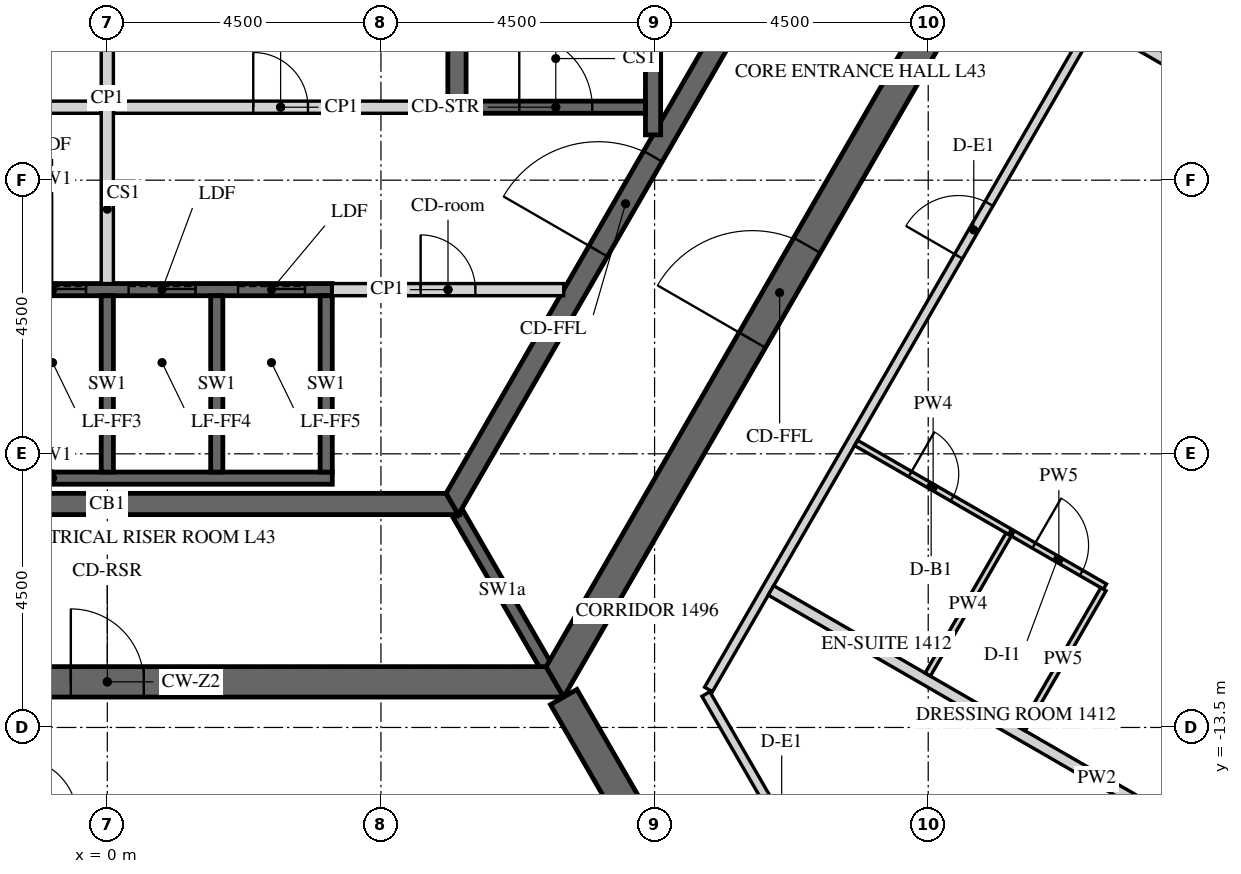
"""IFC4 building model, lengths in metres.
Left out: names, types, materials, properties, quantities, classifications, styles, units other than length and angle.
Written with IfcOpenShell. Run it as: python <this file> out.ifc"""

import sys

from ifc_helpers import new_model, si_unit, direction, frame, frame_2d, origin, place, context, subcontext, project, spatial, polyline, rectangle, outline, extrude, element, fill, save


model = new_model("IFC4")
c1 = context("Model", 3, precision=1e-05, world=origin(), true_north=direction((0.0, 1.0)))
c2 = subcontext(c1, "Body", "Model", "MODEL_VIEW")
j1 = project(units=[si_unit("LENGTHUNIT", "METRE"), si_unit("PLANEANGLEUNIT", "RADIAN")], contexts=[c1])
p1 = place(None, origin())
s1 = spatial("IfcSite", under=j1, at=p1, CompositionType="ELEMENT")
p2 = place(p1, origin())
s2 = spatial("IfcBuilding", under=s1, at=p2, CompositionType="ELEMENT")
p3 = place(p2, frame((0.0, 0.0, 183.9)))
s3 = spatial("IfcBuildingStorey", under=s2, at=p3, CompositionType="ELEMENT", Elevation=183.9)
p4 = place(p3, frame((-7.361, -12.75, -0.15), z_axis=(0.0, 0.0, 1.0), x_axis=(1.0, 0.0, 0.0)))
e1 = element("IfcWall", 1, at=p4, inside=s3, PredefinedType="SHEAR", context=c2, shape_type="SweptSolid", body=[
    extrude(outline(polyline([(-0.144, -0.25), (14.866, -0.25), (14.578, 0.25), (0.144, 0.25), (-0.144, -0.25)])), origin(), (0.0, 0.0, 1.0), 3.9),
])
p5 = place(p4, frame((6.761, 0.0, 0.15)))
e2 = element("IfcOpeningElement", 2, at=p5, cuts=e1, PredefinedType="OPENING", context=c2, shape_type="SweptSolid", body=[
    extrude(rectangle(XDim=1.2, YDim=2.4, at=frame_2d((0.6, 1.2))), frame((0.0, 0.26, 0.0), z_axis=(0.0, -1.0, 0.0), x_axis=(1.0, 0.0, 0.0)), (0.0, 0.0, 1.0), 0.52),
])
p6 = place(p3, frame((7.361, -12.75, -0.15), z_axis=(0.0, 0.0, 1.0), x_axis=(0.50000571537, 0.866022103989, 0.0)))
e3 = element("IfcWall", 3, at=p6, inside=s3, PredefinedType="SHEAR", context=c2, shape_type="SweptSolid", body=[
    extrude(outline(polyline([(-0.144, -0.25), (14.867, -0.25), (14.578, 0.25), (0.144, 0.25), (-0.144, -0.25)])), origin(), (0.0, 0.0, 1.0), 3.9),
])
p7 = place(p6, frame((6.49, 0.0, 0.15)))
e4 = element("IfcOpeningElement", 4, at=p7, cuts=e3, PredefinedType="OPENING", context=c2, shape_type="SweptSolid", body=[
    extrude(rectangle(XDim=1.8, YDim=2.4, at=frame_2d((0.9, 1.2))), frame((0.0, 0.26, 0.0), z_axis=(0.0, -1.0, 0.0), x_axis=(1.0, 0.0, 0.0)), (0.0, 0.0, 1.0), 0.52),
])
p8 = place(p3, frame((7.506, -13.0, -0.15), z_axis=(0.0, 0.0, 1.0), x_axis=(0.499988271576, -0.866032175087, 0.0)))
e5 = element("IfcWall", 5, at=p8, inside=s3, PredefinedType="SHEAR", context=c2, shape_type="SweptSolid", body=[
    extrude(rectangle(XDim=15.424, YDim=0.5, at=frame_2d((7.712, 0.0))), origin(), (0.0, 0.0, 1.0), 3.9),
])
p9 = place(p8, frame((6.812, 0.0, 0.15)))
e6 = element("IfcOpeningElement", 6, at=p9, cuts=e5, PredefinedType="OPENING", context=c2, shape_type="SweptSolid", body=[
    extrude(rectangle(XDim=1.8, YDim=2.4, at=frame_2d((0.9, 1.2))), frame((0.0, 0.26, 0.0), z_axis=(0.0, -1.0, 0.0), x_axis=(1.0, 0.0, 0.0)), (0.0, 0.0, 1.0), 0.52),
])
p10 = place(p3, frame((-5.673, -9.825, -0.15), z_axis=(0.0, 0.0, 1.0), x_axis=(1.0, 0.0, 0.0)))
e7 = element("IfcWall", 7, at=p10, inside=s3, PredefinedType="SHEAR", context=c2, shape_type="SweptSolid", body=[
    extrude(outline(polyline([(-0.101, -0.175), (11.446, -0.175), (11.244, 0.175), (0.101, 0.175), (-0.101, -0.175)])), origin(), (0.0, 0.0, 1.0), 3.9),
])
p11 = place(p3, frame((5.673, -9.825, -0.15), z_axis=(0.0, 0.0, 1.0), x_axis=(0.499995046907, 0.866028263435, 0.0)))
e8 = element("IfcWall", 8, at=p11, inside=s3, PredefinedType="SHEAR", context=c2, shape_type="SweptSolid", body=[
    extrude(outline(polyline([(-0.101, -0.175), (11.446, -0.175), (11.244, 0.175), (0.101, 0.175), (-0.101, -0.175)])), origin(), (0.0, 0.0, 1.0), 3.9),
])
p12 = place(p11, frame((4.801, 0.0, 0.15)))
e9 = element("IfcOpeningElement", 9, at=p12, cuts=e8, PredefinedType="OPENING", context=c2, shape_type="SweptSolid", body=[
    extrude(rectangle(XDim=1.8, YDim=2.4, at=frame_2d((0.9, 1.2))), frame((0.0, 0.185, 0.0), z_axis=(0.0, -1.0, 0.0), x_axis=(1.0, 0.0, 0.0)), (0.0, 0.0, 1.0), 0.37),
])
p13 = place(p3, frame((-5.5, -6.3, -0.25), z_axis=(0.0, 0.0, 1.0), x_axis=(1.0, 0.0, 0.0)))
e10 = element("IfcWall", 10, at=p13, inside=s3, PredefinedType="SHEAR", context=c2, shape_type="SweptSolid", body=[
    extrude(rectangle(XDim=9.2, YDim=0.2, at=frame_2d((4.6, 0.0))), origin(), (0.0, 0.0, 1.0), 3.9),
])
p14 = place(p13, frame((0.45, 0.0, 0.25)))
e11 = element("IfcOpeningElement", 11, at=p14, cuts=e10, PredefinedType="OPENING", context=c2, shape_type="SweptSolid", body=[
    extrude(rectangle(XDim=1.1, YDim=2.1, at=frame_2d((0.55, 1.05))), frame((0.0, 0.11, 0.0), z_axis=(0.0, -1.0, 0.0), x_axis=(1.0, 0.0, 0.0)), (0.0, 0.0, 1.0), 0.22),
])
p15 = place(p13, frame((2.25, 0.0, 0.25)))
e12 = element("IfcOpeningElement", 12, at=p15, cuts=e10, PredefinedType="OPENING", context=c2, shape_type="SweptSolid", body=[
    extrude(rectangle(XDim=1.1, YDim=2.1, at=frame_2d((0.55, 1.05))), frame((0.0, 0.11, 0.0), z_axis=(0.0, -1.0, 0.0), x_axis=(1.0, 0.0, 0.0)), (0.0, 0.0, 1.0), 0.22),
])
p16 = place(p13, frame((4.05, 0.0, 0.25)))
e13 = element("IfcOpeningElement", 13, at=p16, cuts=e10, PredefinedType="OPENING", context=c2, shape_type="SweptSolid", body=[
    extrude(rectangle(XDim=1.1, YDim=2.1, at=frame_2d((0.55, 1.05))), frame((0.0, 0.11, 0.0), z_axis=(0.0, -1.0, 0.0), x_axis=(1.0, 0.0, 0.0)), (0.0, 0.0, 1.0), 0.22),
])
p17 = place(p13, frame((5.85, 0.0, 0.25)))
e14 = element("IfcOpeningElement", 14, at=p17, cuts=e10, PredefinedType="OPENING", context=c2, shape_type="SweptSolid", body=[
    extrude(rectangle(XDim=1.1, YDim=2.1, at=frame_2d((0.55, 1.05))), frame((0.0, 0.11, 0.0), z_axis=(0.0, -1.0, 0.0), x_axis=(1.0, 0.0, 0.0)), (0.0, 0.0, 1.0), 0.22),
])
p18 = place(p13, frame((7.65, 0.0, 0.25)))
e15 = element("IfcOpeningElement", 15, at=p18, cuts=e10, PredefinedType="OPENING", context=c2, shape_type="SweptSolid", body=[
    extrude(rectangle(XDim=1.1, YDim=2.1, at=frame_2d((0.55, 1.05))), frame((0.0, 0.11, 0.0), z_axis=(0.0, -1.0, 0.0), x_axis=(1.0, 0.0, 0.0)), (0.0, 0.0, 1.0), 0.22),
])
p19 = place(p3, frame((-5.5, -9.4, -0.25), z_axis=(0.0, 0.0, 1.0), x_axis=(1.0, 0.0, 0.0)))
e16 = element("IfcWall", 16, at=p19, inside=s3, PredefinedType="SHEAR", context=c2, shape_type="SweptSolid", body=[
    extrude(rectangle(XDim=9.2, YDim=0.2, at=frame_2d((4.6, 0.0))), origin(), (0.0, 0.0, 1.0), 3.9),
])
for number, where, z_axis, x_axis in (
    (17, (0.0, -9.3, -0.25), (0.0, 0.0, 1.0), (0.0, 1.0, 0.0)),
    (18, (1.8, -9.3, -0.25), (0.0, 0.0, 1.0), (0.0, 1.0, 0.0)),
    (19, (3.6, -9.3, -0.25), (0.0, 0.0, 1.0), (0.0, 1.0, 0.0)),
):
    element("IfcWall", number, at=place(p3, frame(where, z_axis=z_axis, x_axis=x_axis)), inside=s3, PredefinedType="SHEAR", context=c2, shape_type="SweptSolid", body=[
        extrude(rectangle(XDim=2.9, YDim=0.2, at=frame_2d((1.45, 0.0))), origin(), (0.0, 0.0, 1.0), 3.9),
    ])
p20 = place(p3, frame((-5.6, -3.3, 0.0), z_axis=(0.0, 0.0, 1.0), x_axis=(1.0, 0.0, 0.0)))
e20 = element("IfcWall", 20, at=p20, inside=s3, PredefinedType="PARTITIONING", context=c2, shape_type="SweptSolid", body=[
    extrude(rectangle(XDim=5.5, YDim=0.2, at=frame_2d((2.75, 0.0))), origin(), (0.0, 0.0, 1.0), 3.65),
])
p21 = place(p20, frame((2.3, 0.0, 0.0)))
e21 = element("IfcOpeningElement", 21, at=p21, cuts=e20, PredefinedType="OPENING", context=c2, shape_type="SweptSolid", body=[
    extrude(rectangle(XDim=0.9, YDim=2.1, at=frame_2d((0.45, 1.05))), frame((0.0, 0.11, 0.0), z_axis=(0.0, -1.0, 0.0), x_axis=(1.0, 0.0, 0.0)), (0.0, 0.0, 1.0), 0.22),
])
p22 = place(p3, frame((0.1, -3.3, 0.0), z_axis=(0.0, 0.0, 1.0), x_axis=(1.0, 0.0, 0.0)))
e22 = element("IfcWall", 22, at=p22, inside=s3, PredefinedType="PARTITIONING", context=c2, shape_type="SweptSolid", body=[
    extrude(rectangle(XDim=5.5, YDim=0.2, at=frame_2d((2.75, 0.0))), origin(), (0.0, 0.0, 1.0), 3.65),
])
p23 = place(p22, frame((2.3, 0.0, 0.0)))
e23 = element("IfcOpeningElement", 23, at=p23, cuts=e22, PredefinedType="OPENING", context=c2, shape_type="SweptSolid", body=[
    extrude(rectangle(XDim=0.9, YDim=2.1, at=frame_2d((0.45, 1.05))), frame((0.0, 0.11, 0.0), z_axis=(0.0, -1.0, 0.0), x_axis=(1.0, 0.0, 0.0)), (0.0, 0.0, 1.0), 0.22),
])
p24 = place(p3, frame((0.0, -6.2, 0.0), z_axis=(0.0, 0.0, 1.0), x_axis=(0.0, 1.0, 0.0)))
e24 = element("IfcWall", 24, at=p24, inside=s3, PredefinedType="PARTITIONING", context=c2, shape_type="SweptSolid", body=[
    extrude(rectangle(XDim=6.1, YDim=0.2, at=frame_2d((3.05, 0.0))), origin(), (0.0, 0.0, 1.0), 3.65),
])
p25 = place(p3, frame((3.7, -6.3, 0.0), z_axis=(0.0, 0.0, 1.0), x_axis=(1.0, 0.0, 0.0)))
e25 = element("IfcWall", 25, at=p25, inside=s3, PredefinedType="PARTITIONING", context=c2, shape_type="SweptSolid", body=[
    extrude(rectangle(XDim=3.806, YDim=0.2, at=frame_2d((1.903, 0.0))), origin(), (0.0, 0.0, 1.0), 3.65),
])
p26 = place(p25, frame((1.453, 0.0, 0.0)))
e26 = element("IfcOpeningElement", 26, at=p26, cuts=e25, PredefinedType="OPENING", context=c2, shape_type="SweptSolid", body=[
    extrude(rectangle(XDim=0.9, YDim=2.1, at=frame_2d((0.45, 1.05))), frame((0.0, 0.11, 0.0), z_axis=(0.0, -1.0, 0.0), x_axis=(1.0, 0.0, 0.0)), (0.0, 0.0, 1.0), 0.22),
])
p27 = place(p3, frame((5.773, -10.0, -0.15), z_axis=(0.0, 0.0, 1.0), x_axis=(0.499995765644, -0.866027848477, 0.0)))
e27 = element("IfcWall", 27, at=p27, inside=s3, PredefinedType="SHEAR", context=c2, shape_type="SweptSolid", body=[
    extrude(rectangle(XDim=2.887, YDim=0.2, at=frame_2d((1.443, 0.0))), origin(), (0.0, 0.0, 1.0), 3.9),
])
p28 = place(p3, frame((5.75, -3.4, -0.25), z_axis=(0.0, 0.0, 1.0), x_axis=(0.0, 1.0, 0.0)))
e28 = element("IfcWall", 28, at=p28, inside=s3, PredefinedType="SHEAR", context=c2, shape_type="SweptSolid", body=[
    extrude(rectangle(XDim=6.8, YDim=0.3, at=frame_2d((3.4, 0.0))), origin(), (0.0, 0.0, 1.0), 3.9),
])
p29 = place(p3, frame((8.975, -3.755, -0.25), z_axis=(0.0, 0.0, 1.0), x_axis=(0.0, 1.0, 0.0)))
e29 = element("IfcWall", 29, at=p29, inside=s3, PredefinedType="SHEAR", context=c2, shape_type="SweptSolid", body=[
    extrude(rectangle(XDim=7.51, YDim=0.25, at=frame_2d((3.755, 0.0))), origin(), (0.0, 0.0, 1.0), 3.9),
])
p30 = place(p3, frame((5.9, -3.3, -0.25), z_axis=(0.0, 0.0, 1.0), x_axis=(1.0, 0.0, 0.0)))
e30 = element("IfcWall", 30, at=p30, inside=s3, PredefinedType="SHEAR", context=c2, shape_type="SweptSolid", body=[
    extrude(rectangle(XDim=2.95, YDim=0.2, at=frame_2d((1.475, 0.0))), origin(), (0.0, 0.0, 1.0), 3.9),
])
p31 = place(p30, frame((0.875, 0.0, 0.25)))
e31 = element("IfcOpeningElement", 31, at=p31, cuts=e30, PredefinedType="OPENING", context=c2, shape_type="SweptSolid", body=[
    extrude(rectangle(XDim=1.2, YDim=2.4, at=frame_2d((0.6, 1.2))), frame((0.0, 0.11, 0.0), z_axis=(0.0, -1.0, 0.0), x_axis=(1.0, 0.0, 0.0)), (0.0, 0.0, 1.0), 0.22),
])
p32 = place(p3, frame((13.699, -19.628, 0.0), z_axis=(0.0, 0.0, 1.0), x_axis=(-0.499993780622, 0.866028994514, 0.0)))
e32 = element("IfcWall", 32, at=p32, inside=s3, PredefinedType="PARTITIONING", context=c2, shape_type="SweptSolid", body=[
    extrude(rectangle(XDim=7.711, YDim=0.15, at=frame_2d((3.855, 0.0))), origin(), (0.0, 0.0, 1.0), 2.988),
])
p33 = place(p32, frame((4.718, 0.0, 0.0)))
e33 = element("IfcOpeningElement", 33, at=p33, cuts=e32, PredefinedType="OPENING", context=c2, shape_type="SweptSolid", body=[
    extrude(rectangle(XDim=1.0, YDim=2.1, at=frame_2d((0.5, 1.05))), frame((0.0, 0.085, 0.0), z_axis=(0.0, -1.0, 0.0), x_axis=(1.0, 0.0, 0.0)), (0.0, 0.0, 1.0), 0.17),
])
p34 = place(p3, frame((9.887, -12.875, 0.0), z_axis=(0.0, 0.0, 1.0), x_axis=(0.499998228944, 0.866026426302, 0.0)))
e34 = element("IfcWall", 34, at=p34, inside=s3, PredefinedType="PARTITIONING", context=c2, shape_type="SweptSolid", body=[
    extrude(rectangle(XDim=14.867, YDim=0.15, at=frame_2d((7.433, 0.0))), origin(), (0.0, 0.0, 1.0), 2.988),
])
p35 = place(p34, frame((8.224, 0.0, 0.0)))
e35 = element("IfcOpeningElement", 35, at=p35, cuts=e34, PredefinedType="OPENING", context=c2, shape_type="SweptSolid", body=[
    extrude(rectangle(XDim=1.0, YDim=2.1, at=frame_2d((0.5, 1.05))), frame((0.0, 0.085, 0.0), z_axis=(0.0, -1.0, 0.0), x_axis=(1.0, 0.0, 0.0)), (0.0, 0.0, 1.0), 0.17),
])
p36 = place(p34, frame((13.717, 0.0, 0.0)))
e36 = element("IfcOpeningElement", 36, at=p36, cuts=e34, PredefinedType="OPENING", context=c2, shape_type="SweptSolid", body=[
    extrude(rectangle(XDim=1.0, YDim=2.1, at=frame_2d((0.5, 1.05))), frame((0.0, 0.085, 0.0), z_axis=(0.0, -1.0, 0.0), x_axis=(1.0, 0.0, 0.0)), (0.0, 0.0, 1.0), 0.17),
])
p37 = place(p3, frame((21.631, -17.433, 0.0), z_axis=(0.0, 0.0, 1.0), x_axis=(-0.866024931941, 0.500000817256, 0.0)))
e37 = element("IfcWall", 37, at=p37, inside=s3, PredefinedType="PARTITIONING", context=c2, shape_type="SweptSolid", body=[
    extrude(rectangle(XDim=12.375, YDim=0.18, at=frame_2d((6.188, 0.0))), origin(), (0.0, 0.0, 1.0), 2.988),
])
p38 = place(p3, frame((12.314, -8.821, 0.0), z_axis=(0.0, 0.0, 1.0), x_axis=(0.866046596414, -0.499963291492, 0.0)))
e38 = element("IfcWall", 38, at=p38, inside=s3, PredefinedType="PARTITIONING", context=c2, shape_type="SweptSolid", body=[
    extrude(rectangle(XDim=2.925, YDim=0.1, at=frame_2d((1.462, 0.0))), origin(), (0.0, 0.0, 1.0), 2.988),
])
p39 = place(p38, frame((1.025, 0.0, 0.0)))
e39 = element("IfcOpeningElement", 39, at=p39, cuts=e38, PredefinedType="OPENING", context=c2, shape_type="SweptSolid", body=[
    extrude(rectangle(XDim=0.8, YDim=2.1, at=frame_2d((0.4, 1.05))), frame((0.0, 0.06, 0.0), z_axis=(0.0, -1.0, 0.0), x_axis=(1.0, 0.0, 0.0)), (0.0, 0.0, 1.0), 0.12),
])
p40 = place(p3, frame((14.891, -10.309, 0.0), z_axis=(0.0, 0.0, 1.0), x_axis=(0.866036909293, -0.499980071345, 0.0)))
e40 = element("IfcWall", 40, at=p40, inside=s3, PredefinedType="PARTITIONING", context=c2, shape_type="SweptSolid", body=[
    extrude(rectangle(XDim=1.75, YDim=0.1, at=frame_2d((0.875, 0.0))), origin(), (0.0, 0.0, 1.0), 2.988),
])
p41 = place(p40, frame((0.4, 0.0, 0.0)))
e41 = element("IfcOpeningElement", 41, at=p41, cuts=e40, PredefinedType="OPENING", context=c2, shape_type="SweptSolid", body=[
    extrude(rectangle(XDim=0.9, YDim=2.1, at=frame_2d((0.45, 1.05))), frame((0.0, 0.06, 0.0), z_axis=(0.0, -1.0, 0.0), x_axis=(1.0, 0.0, 0.0)), (0.0, 0.0, 1.0), 0.12),
])
p42 = place(p3, frame((16.381, -11.227, 0.0), z_axis=(0.0, 0.0, 1.0), x_axis=(-0.500008456887, -0.866020521143, 0.0)))
e42 = element("IfcWall", 42, at=p42, inside=s3, PredefinedType="PARTITIONING", context=c2, shape_type="SweptSolid", body=[
    extrude(rectangle(XDim=2.66, YDim=0.1, at=frame_2d((1.33, 0.0))), origin(), (0.0, 0.0, 1.0), 2.988),
])
p43 = place(p3, frame((27.031, -8.08, 0.0), z_axis=(0.0, 0.0, 1.0), x_axis=(-0.866024931941, 0.500000817256, 0.0)))
e43 = element("IfcWall", 43, at=p43, inside=s3, PredefinedType="PARTITIONING", context=c2, shape_type="SweptSolid", body=[
    extrude(rectangle(XDim=12.375, YDim=0.18, at=frame_2d((6.188, 0.0))), origin(), (0.0, 0.0, 1.0), 2.988),
])
p44 = place(p3, frame((13.492, -12.63, 0.0), z_axis=(0.0, 0.0, 1.0), x_axis=(0.50004820116, 0.865997573043, 0.0)))
e44 = element("IfcWall", 44, at=p44, inside=s3, PredefinedType="PARTITIONING", context=c2, shape_type="SweptSolid", body=[
    extrude(rectangle(XDim=2.66, YDim=0.1, at=frame_2d((1.33, 0.0))), origin(), (0.0, 0.0, 1.0), 2.988),
])
p45 = place(p7, origin())
e45 = element("IfcDoor", 45, at=p45, inside=s3, OperationType="DOUBLE_DOOR_SINGLE_SWING", PredefinedType="DOOR", context=c2, shape_type="SweptSolid", body=[
    extrude(rectangle(XDim=1.8, YDim=2.4, at=frame_2d((0.9, 1.2))), frame((0.0, 0.025, 0.0), z_axis=(0.0, -1.0, 0.0), x_axis=(1.0, 0.0, 0.0)), (0.0, 0.0, 1.0), 0.05),
])
fill(e4, e45)
p46 = place(p5, origin())
e46 = element("IfcDoor", 46, at=p46, inside=s3, OperationType="SINGLE_SWING_LEFT", PredefinedType="DOOR", context=c2, shape_type="SweptSolid", body=[
    extrude(rectangle(XDim=1.2, YDim=2.4, at=frame_2d((0.6, 1.2))), frame((0.0, 0.025, 0.0), z_axis=(0.0, -1.0, 0.0), x_axis=(1.0, 0.0, 0.0)), (0.0, 0.0, 1.0), 0.05),
])
fill(e2, e46)
p47 = place(p12, origin())
e47 = element("IfcDoor", 47, at=p47, inside=s3, OperationType="DOUBLE_DOOR_SINGLE_SWING", PredefinedType="DOOR", context=c2, shape_type="SweptSolid", body=[
    extrude(rectangle(XDim=1.8, YDim=2.4, at=frame_2d((0.9, 1.2))), frame((0.0, 0.025, 0.0), z_axis=(0.0, -1.0, 0.0), x_axis=(1.0, 0.0, 0.0)), (0.0, 0.0, 1.0), 0.05),
])
fill(e9, e47)
p48 = place(p23, origin())
e48 = element("IfcDoor", 48, at=p48, inside=s3, OperationType="SINGLE_SWING_LEFT", PredefinedType="DOOR", context=c2, shape_type="SweptSolid", body=[
    extrude(rectangle(XDim=0.9, YDim=2.1, at=frame_2d((0.45, 1.05))), frame((0.0, 0.025, 0.0), z_axis=(0.0, -1.0, 0.0), x_axis=(1.0, 0.0, 0.0)), (0.0, 0.0, 1.0), 0.05),
])
fill(e23, e48)
p49 = place(p26, origin())
e49 = element("IfcDoor", 49, at=p49, inside=s3, OperationType="SINGLE_SWING_LEFT", PredefinedType="DOOR", context=c2, shape_type="SweptSolid", body=[
    extrude(rectangle(XDim=0.9, YDim=2.1, at=frame_2d((0.45, 1.05))), frame((0.0, 0.025, 0.0), z_axis=(0.0, -1.0, 0.0), x_axis=(1.0, 0.0, 0.0)), (0.0, 0.0, 1.0), 0.05),
])
fill(e26, e49)
p50 = place(p31, origin())
e50 = element("IfcDoor", 50, at=p50, inside=s3, OperationType="SINGLE_SWING_LEFT", PredefinedType="DOOR", context=c2, shape_type="SweptSolid", body=[
    extrude(rectangle(XDim=1.2, YDim=2.4, at=frame_2d((0.6, 1.2))), frame((0.0, 0.025, 0.0), z_axis=(0.0, -1.0, 0.0), x_axis=(1.0, 0.0, 0.0)), (0.0, 0.0, 1.0), 0.05),
])
fill(e31, e50)
p51 = place(p16, origin())
e51 = element("IfcDoor", 51, at=p51, inside=s3, OperationType="SLIDING_TO_LEFT", PredefinedType="DOOR", context=c2, shape_type="SweptSolid", body=[
    extrude(rectangle(XDim=1.1, YDim=2.1, at=frame_2d((0.55, 1.05))), frame((0.0, 0.025, 0.0), z_axis=(0.0, -1.0, 0.0), x_axis=(1.0, 0.0, 0.0)), (0.0, 0.0, 1.0), 0.05),
])
fill(e13, e51)
p52 = place(p17, origin())
e52 = element("IfcDoor", 52, at=p52, inside=s3, OperationType="SLIDING_TO_LEFT", PredefinedType="DOOR", context=c2, shape_type="SweptSolid", body=[
    extrude(rectangle(XDim=1.1, YDim=2.1, at=frame_2d((0.55, 1.05))), frame((0.0, 0.025, 0.0), z_axis=(0.0, -1.0, 0.0), x_axis=(1.0, 0.0, 0.0)), (0.0, 0.0, 1.0), 0.05),
])
fill(e14, e52)
p53 = place(p18, origin())
e53 = element("IfcDoor", 53, at=p53, inside=s3, OperationType="SLIDING_TO_LEFT", PredefinedType="DOOR", context=c2, shape_type="SweptSolid", body=[
    extrude(rectangle(XDim=1.1, YDim=2.1, at=frame_2d((0.55, 1.05))), frame((0.0, 0.025, 0.0), z_axis=(0.0, -1.0, 0.0), x_axis=(1.0, 0.0, 0.0)), (0.0, 0.0, 1.0), 0.05),
])
fill(e15, e53)
p54 = place(p35, origin())
e54 = element("IfcDoor", 54, at=p54, inside=s3, OperationType="SINGLE_SWING_LEFT", PredefinedType="DOOR", context=c2, shape_type="SweptSolid", body=[
    extrude(rectangle(XDim=1.0, YDim=2.1, at=frame_2d((0.5, 1.05))), frame((0.0, 0.025, 0.0), z_axis=(0.0, -1.0, 0.0), x_axis=(1.0, 0.0, 0.0)), (0.0, 0.0, 1.0), 0.05),
])
fill(e35, e54)
p55 = place(p39, origin())
e55 = element("IfcDoor", 55, at=p55, inside=s3, OperationType="SINGLE_SWING_RIGHT", PredefinedType="DOOR", context=c2, shape_type="SweptSolid", body=[
    extrude(rectangle(XDim=0.8, YDim=2.1, at=frame_2d((0.4, 1.05))), frame((0.0, 0.025, 0.0), z_axis=(0.0, -1.0, 0.0), x_axis=(1.0, 0.0, 0.0)), (0.0, 0.0, 1.0), 0.05),
])
fill(e39, e55)
p56 = place(p41, origin())
e56 = element("IfcDoor", 56, at=p56, inside=s3, OperationType="SINGLE_SWING_RIGHT", PredefinedType="DOOR", context=c2, shape_type="SweptSolid", body=[
    extrude(rectangle(XDim=0.9, YDim=2.1, at=frame_2d((0.45, 1.05))), frame((0.0, 0.025, 0.0), z_axis=(0.0, -1.0, 0.0), x_axis=(1.0, 0.0, 0.0)), (0.0, 0.0, 1.0), 0.05),
])
fill(e41, e56)
save(model, sys.argv[1])
